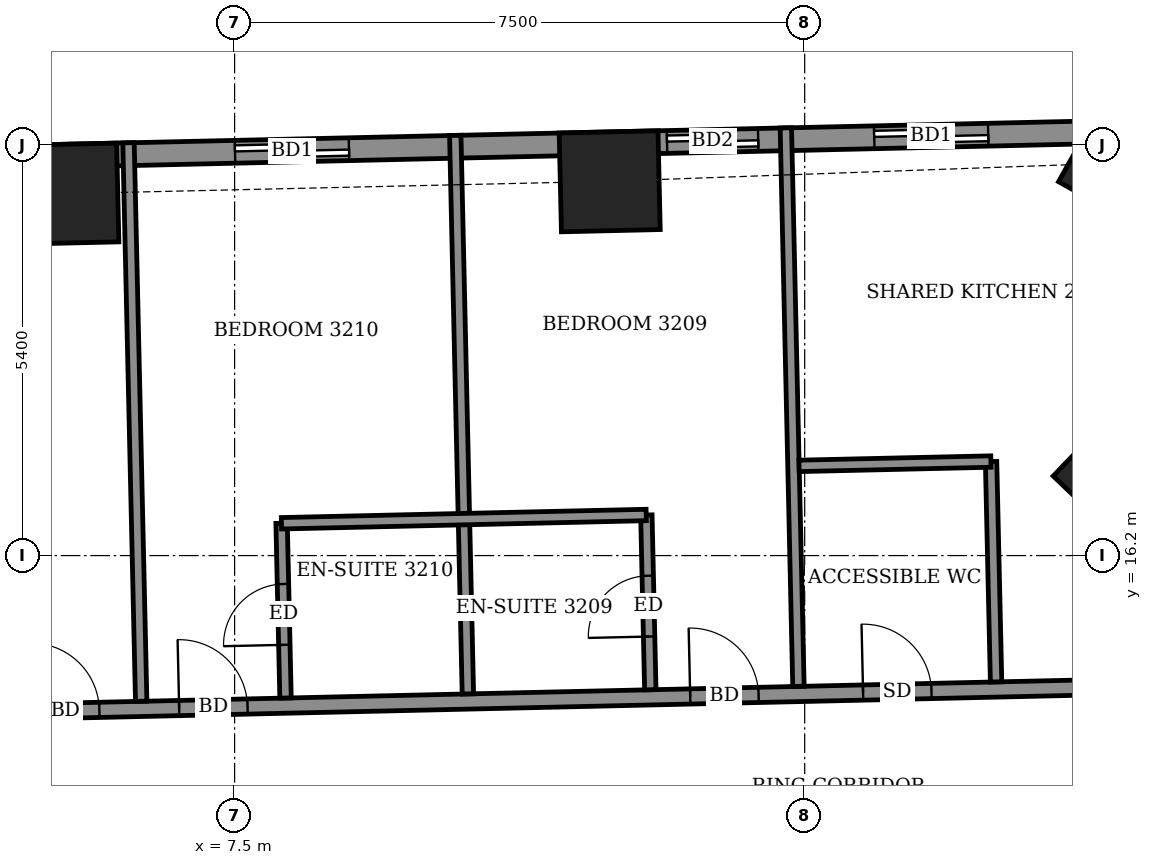
"""IFC4 building model, lengths in metres.
Left out: names, types, materials, properties, quantities, classifications, styles, units other than length and angle.
Written with IfcOpenShell. Run it as: python <this file> out.ifc"""

import sys

from ifc_helpers import new_model, si_unit, direction, frame, frame_2d, origin, origin_2d, place, context, subcontext, project, spatial, rectangle, extrude, element, fill, save


model = new_model("IFC4")
c1 = context("Model", 3, precision=1e-05, world=origin(), true_north=direction((0.0, 1.0)))
c2 = subcontext(c1, "Body", "Model", "MODEL_VIEW")
j1 = project(units=[si_unit("LENGTHUNIT", "METRE"), si_unit("PLANEANGLEUNIT", "RADIAN")], contexts=[c1])
p1 = place(None, origin())
s1 = spatial("IfcSite", under=j1, at=p1, CompositionType="ELEMENT")
p2 = place(p1, origin())
s2 = spatial("IfcBuilding", under=s1, at=p2, CompositionType="ELEMENT")
p3 = place(p2, frame((0.0, 0.0, 130.1)))
s3 = spatial("IfcBuildingStorey", under=s2, at=p3, CompositionType="ELEMENT", Elevation=130.1)
for number, where, z_axis, x_axis in (
    (1, (19.189, 17.267, -0.55), (0.0, 0.0, 1.0), (-0.723, 0.691, 0.0)),
    (2, (19.225, 21.369, -0.55), (0.0, 0.0, 1.0), (-0.873, 0.488, 0.0)),
    (3, (12.435, 21.124, -0.55), (0.0, 0.0, 1.0), (-1.0, -0.023, 0.0)),
    (4, (5.313, 20.962, -0.55), (0.0, 0.0, 1.0), (-1.0, -0.023, 0.0)),
):
    element("IfcColumn", number, at=place(p3, frame(where, z_axis=z_axis, x_axis=x_axis)), inside=s3, PredefinedType="COLUMN", context=c2, shape_type="SweptSolid", body=[
        extrude(rectangle(XDim=1.3, YDim=1.3, at=origin_2d()), origin(), (0.0, 0.0, 1.0), 3.6),
    ])
p4 = place(p3, frame((19.396, 21.782, 0.0), z_axis=(0.0, 0.0, 1.0), x_axis=(-0.999742636707, -0.022686126826, 0.0)))
e5 = element("IfcWall", 5, at=p4, inside=s3, PredefinedType="SOLIDWALL", context=c2, shape_type="SweptSolid", body=[
    extrude(rectangle(XDim=42.444, YDim=0.3, at=frame_2d((21.222, 0.0))), origin(), (0.0, 0.0, 1.0), 3.05),
])
p5 = place(p4, frame((1.982, 0.0, 0.0)))
e6 = element("IfcOpeningElement", 6, at=p5, cuts=e5, PredefinedType="OPENING", context=c2, shape_type="SweptSolid", body=[
    extrude(rectangle(XDim=1.5, YDim=2.4, at=frame_2d((0.75, 1.2))), frame((0.0, 0.16, 0.0), z_axis=(0.0, -1.0, 0.0), x_axis=(1.0, 0.0, 0.0)), (0.0, 0.0, 1.0), 0.32),
])
p6 = place(p4, frame((5.009, 0.0, 0.0)))
e7 = element("IfcOpeningElement", 7, at=p6, cuts=e5, PredefinedType="OPENING", context=c2, shape_type="SweptSolid", body=[
    extrude(rectangle(XDim=1.2, YDim=2.4, at=frame_2d((0.6, 1.2))), frame((0.0, 0.16, 0.0), z_axis=(0.0, -1.0, 0.0), x_axis=(1.0, 0.0, 0.0)), (0.0, 0.0, 1.0), 0.32),
])
p7 = place(p4, frame((10.394, 0.0, 0.0)))
e8 = element("IfcOpeningElement", 8, at=p7, cuts=e5, PredefinedType="OPENING", context=c2, shape_type="SweptSolid", body=[
    extrude(rectangle(XDim=1.5, YDim=2.4, at=frame_2d((0.75, 1.2))), frame((0.0, 0.16, 0.0), z_axis=(0.0, -1.0, 0.0), x_axis=(1.0, 0.0, 0.0)), (0.0, 0.0, 1.0), 0.32),
])
p8 = place(p4, frame((15.346, 0.0, 0.0)))
e9 = element("IfcOpeningElement", 9, at=p8, cuts=e5, PredefinedType="OPENING", context=c2, shape_type="SweptSolid", body=[
    extrude(rectangle(XDim=1.5, YDim=2.4, at=frame_2d((0.75, 1.2))), frame((0.0, 0.16, 0.0), z_axis=(0.0, -1.0, 0.0), x_axis=(1.0, 0.0, 0.0)), (0.0, 0.0, 1.0), 0.32),
])
p9 = place(p4, frame((18.508, 0.0, 0.0)))
e10 = element("IfcOpeningElement", 10, at=p9, cuts=e5, PredefinedType="OPENING", context=c2, shape_type="SweptSolid", body=[
    extrude(rectangle(XDim=1.5, YDim=2.4, at=frame_2d((0.75, 1.2))), frame((0.0, 0.16, 0.0), z_axis=(0.0, -1.0, 0.0), x_axis=(1.0, 0.0, 0.0)), (0.0, 0.0, 1.0), 0.32),
])
p10 = place(p4, frame((23.544, 0.0, 0.0)))
e11 = element("IfcOpeningElement", 11, at=p10, cuts=e5, PredefinedType="OPENING", context=c2, shape_type="SweptSolid", body=[
    extrude(rectangle(XDim=1.5, YDim=2.4, at=frame_2d((0.75, 1.2))), frame((0.0, 0.16, 0.0), z_axis=(0.0, -1.0, 0.0), x_axis=(1.0, 0.0, 0.0)), (0.0, 0.0, 1.0), 0.32),
])
p11 = place(p4, frame((29.195, 0.0, 0.0)))
e12 = element("IfcOpeningElement", 12, at=p11, cuts=e5, PredefinedType="OPENING", context=c2, shape_type="SweptSolid", body=[
    extrude(rectangle(XDim=1.5, YDim=2.4, at=frame_2d((0.75, 1.2))), frame((0.0, 0.16, 0.0), z_axis=(0.0, -1.0, 0.0), x_axis=(1.0, 0.0, 0.0)), (0.0, 0.0, 1.0), 0.32),
])
p12 = place(p4, frame((32.357, 0.0, 0.0)))
e13 = element("IfcOpeningElement", 13, at=p12, cuts=e5, PredefinedType="OPENING", context=c2, shape_type="SweptSolid", body=[
    extrude(rectangle(XDim=1.5, YDim=2.4, at=frame_2d((0.75, 1.2))), frame((0.0, 0.16, 0.0), z_axis=(0.0, -1.0, 0.0), x_axis=(1.0, 0.0, 0.0)), (0.0, 0.0, 1.0), 0.32),
])
p13 = place(p4, frame((37.524, 0.0, 0.9)))
e14 = element("IfcOpeningElement", 14, at=p13, cuts=e5, PredefinedType="OPENING", context=c2, shape_type="SweptSolid", body=[
    extrude(rectangle(XDim=2.4, YDim=1.5, at=frame_2d((1.2, 0.75))), frame((0.0, 0.16, 0.0), z_axis=(0.0, -1.0, 0.0), x_axis=(1.0, 0.0, 0.0)), (0.0, 0.0, 1.0), 0.32),
])
p14 = place(p3, frame((-26.421, 13.441, 0.0), z_axis=(0.0, 0.0, 1.0), x_axis=(0.999742754064, 0.022680954485, 0.0)))
e15 = element("IfcWall", 15, at=p14, inside=s3, PredefinedType="PARTITIONING", context=c2, shape_type="SweptSolid", body=[
    extrude(rectangle(XDim=48.945, YDim=0.2, at=frame_2d((24.472, 0.0))), origin(), (0.0, 0.0, 1.0), 3.05),
])
p15 = place(p14, frame((46.647, 0.0, 0.0)))
e16 = element("IfcOpeningElement", 16, at=p15, cuts=e15, PredefinedType="OPENING", context=c2, shape_type="SweptSolid", body=[
    extrude(rectangle(XDim=1.0, YDim=2.1, at=frame_2d((0.5, 1.05))), frame((0.0, 0.11, 0.0), z_axis=(0.0, -1.0, 0.0), x_axis=(1.0, 0.0, 0.0)), (0.0, 0.0, 1.0), 0.22),
])
p16 = place(p14, frame((42.2, 0.0, 0.0)))
e17 = element("IfcOpeningElement", 17, at=p16, cuts=e15, PredefinedType="OPENING", context=c2, shape_type="SweptSolid", body=[
    extrude(rectangle(XDim=0.9, YDim=2.1, at=frame_2d((0.45, 1.05))), frame((0.0, 0.11, 0.0), z_axis=(0.0, -1.0, 0.0), x_axis=(1.0, 0.0, 0.0)), (0.0, 0.0, 1.0), 0.22),
])
p17 = place(p14, frame((39.925, 0.0, 0.0)))
e18 = element("IfcOpeningElement", 18, at=p17, cuts=e15, PredefinedType="OPENING", context=c2, shape_type="SweptSolid", body=[
    extrude(rectangle(XDim=0.9, YDim=2.1, at=frame_2d((0.45, 1.05))), frame((0.0, 0.11, 0.0), z_axis=(0.0, -1.0, 0.0), x_axis=(1.0, 0.0, 0.0)), (0.0, 0.0, 1.0), 0.22),
])
p18 = place(p14, frame((33.2, 0.0, 0.0)))
e19 = element("IfcOpeningElement", 19, at=p18, cuts=e15, PredefinedType="OPENING", context=c2, shape_type="SweptSolid", body=[
    extrude(rectangle(XDim=0.9, YDim=2.1, at=frame_2d((0.45, 1.05))), frame((0.0, 0.11, 0.0), z_axis=(0.0, -1.0, 0.0), x_axis=(1.0, 0.0, 0.0)), (0.0, 0.0, 1.0), 0.22),
])
p19 = place(p14, frame((31.25, 0.0, 0.0)))
e20 = element("IfcOpeningElement", 20, at=p19, cuts=e15, PredefinedType="OPENING", context=c2, shape_type="SweptSolid", body=[
    extrude(rectangle(XDim=0.9, YDim=2.1, at=frame_2d((0.45, 1.05))), frame((0.0, 0.11, 0.0), z_axis=(0.0, -1.0, 0.0), x_axis=(1.0, 0.0, 0.0)), (0.0, 0.0, 1.0), 0.22),
])
p20 = place(p14, frame((24.5, 0.0, 0.0)))
e21 = element("IfcOpeningElement", 21, at=p20, cuts=e15, PredefinedType="OPENING", context=c2, shape_type="SweptSolid", body=[
    extrude(rectangle(XDim=0.9, YDim=2.1, at=frame_2d((0.45, 1.05))), frame((0.0, 0.11, 0.0), z_axis=(0.0, -1.0, 0.0), x_axis=(1.0, 0.0, 0.0)), (0.0, 0.0, 1.0), 0.22),
])
p21 = place(p14, frame((22.45, 0.0, 0.0)))
e22 = element("IfcOpeningElement", 22, at=p21, cuts=e15, PredefinedType="OPENING", context=c2, shape_type="SweptSolid", body=[
    extrude(rectangle(XDim=0.9, YDim=2.1, at=frame_2d((0.45, 1.05))), frame((0.0, 0.11, 0.0), z_axis=(0.0, -1.0, 0.0), x_axis=(1.0, 0.0, 0.0)), (0.0, 0.0, 1.0), 0.22),
])
p22 = place(p14, frame((15.475, 0.0, 0.0)))
e23 = element("IfcOpeningElement", 23, at=p22, cuts=e15, PredefinedType="OPENING", context=c2, shape_type="SweptSolid", body=[
    extrude(rectangle(XDim=0.9, YDim=2.1, at=frame_2d((0.45, 1.05))), frame((0.0, 0.11, 0.0), z_axis=(0.0, -1.0, 0.0), x_axis=(1.0, 0.0, 0.0)), (0.0, 0.0, 1.0), 0.22),
])
p23 = place(p14, frame((13.4, 0.0, 0.0)))
e24 = element("IfcOpeningElement", 24, at=p23, cuts=e15, PredefinedType="OPENING", context=c2, shape_type="SweptSolid", body=[
    extrude(rectangle(XDim=0.9, YDim=2.1, at=frame_2d((0.45, 1.05))), frame((0.0, 0.11, 0.0), z_axis=(0.0, -1.0, 0.0), x_axis=(1.0, 0.0, 0.0)), (0.0, 0.0, 1.0), 0.22),
])
p24 = place(p14, frame((2.725, 0.0, 0.0)))
e25 = element("IfcOpeningElement", 25, at=p24, cuts=e15, PredefinedType="OPENING", context=c2, shape_type="SweptSolid", body=[
    extrude(rectangle(XDim=1.0, YDim=2.1, at=frame_2d((0.5, 1.05))), frame((0.0, 0.11, 0.0), z_axis=(0.0, -1.0, 0.0), x_axis=(1.0, 0.0, 0.0)), (0.0, 0.0, 1.0), 0.22),
])
p25 = place(p14, frame((8.7, 0.0, 0.0)))
e26 = element("IfcOpeningElement", 26, at=p25, cuts=e15, PredefinedType="OPENING", context=c2, shape_type="SweptSolid", body=[
    extrude(rectangle(XDim=0.9, YDim=2.1, at=frame_2d((0.45, 1.05))), frame((0.0, 0.11, 0.0), z_axis=(0.0, -1.0, 0.0), x_axis=(1.0, 0.0, 0.0)), (0.0, 0.0, 1.0), 0.22),
])
p26 = place(p3, frame((6.271, 14.283, 0.0), z_axis=(0.0, 0.0, 1.0), x_axis=(-0.022719896304, 0.99974186984, 0.0)))
e27 = element("IfcWall", 27, at=p26, inside=s3, PredefinedType="PARTITIONING", context=c2, shape_type="SweptSolid", body=[
    extrude(rectangle(XDim=7.35, YDim=0.15, at=frame_2d((3.675, 0.0))), origin(), (0.0, 0.0, 1.0), 2.55),
])
p27 = place(p3, frame((8.17, 14.326, 0.0), z_axis=(0.0, 0.0, 1.0), x_axis=(-0.022612884682, 0.999744296031, 0.0)))
e28 = element("IfcWall", 28, at=p27, inside=s3, PredefinedType="PARTITIONING", context=c2, shape_type="SweptSolid", body=[
    extrude(rectangle(XDim=2.3, YDim=0.15, at=frame_2d((1.15, 0.0))), origin(), (0.0, 0.0, 1.0), 3.05),
])
p28 = place(p27, frame((0.7, 0.0, 0.0)))
e29 = element("IfcOpeningElement", 29, at=p28, cuts=e28, PredefinedType="OPENING", context=c2, shape_type="SweptSolid", body=[
    extrude(rectangle(XDim=0.8, YDim=2.1, at=frame_2d((0.4, 1.05))), frame((0.0, 0.085, 0.0), z_axis=(0.0, -1.0, 0.0), x_axis=(1.0, 0.0, 0.0)), (0.0, 0.0, 1.0), 0.17),
])
p29 = place(p3, frame((10.569, 14.38, 0.0), z_axis=(0.0, 0.0, 1.0), x_axis=(-0.022587099398, 0.999744878927, 0.0)))
e30 = element("IfcWall", 30, at=p29, inside=s3, PredefinedType="PARTITIONING", context=c2, shape_type="SweptSolid", body=[
    extrude(rectangle(XDim=7.35, YDim=0.15, at=frame_2d((3.675, 0.0))), origin(), (0.0, 0.0, 1.0), 2.55),
])
p30 = place(p3, frame((12.969, 14.435, 0.0), z_axis=(0.0, 0.0, 1.0), x_axis=(-0.022615284993, 0.999744241736, 0.0)))
e31 = element("IfcWall", 31, at=p30, inside=s3, PredefinedType="PARTITIONING", context=c2, shape_type="SweptSolid", body=[
    extrude(rectangle(XDim=2.299, YDim=0.15, at=frame_2d((1.15, 0.0))), origin(), (0.0, 0.0, 1.0), 3.05),
])
p31 = place(p30, frame((0.7, 0.0, 0.0)))
e32 = element("IfcOpeningElement", 32, at=p31, cuts=e31, PredefinedType="OPENING", context=c2, shape_type="SweptSolid", body=[
    extrude(rectangle(XDim=0.8, YDim=2.1, at=frame_2d((0.4, 1.05))), frame((0.0, 0.085, 0.0), z_axis=(0.0, -1.0, 0.0), x_axis=(1.0, 0.0, 0.0)), (0.0, 0.0, 1.0), 0.17),
])
p32 = place(p3, frame((14.918, 14.479, 0.0), z_axis=(0.0, 0.0, 1.0), x_axis=(-0.022587849492, 0.99974486198, 0.0)))
e33 = element("IfcWall", 33, at=p32, inside=s3, PredefinedType="PARTITIONING", context=c2, shape_type="SweptSolid", body=[
    extrude(rectangle(XDim=7.35, YDim=0.15, at=frame_2d((3.675, 0.0))), origin(), (0.0, 0.0, 1.0), 2.55),
])
p33 = place(p3, frame((17.518, 14.538, 0.0), z_axis=(0.0, 0.0, 1.0), x_axis=(-0.022817032779, 0.999739657619, 0.0)))
e34 = element("IfcWall", 34, at=p33, inside=s3, PredefinedType="PARTITIONING", context=c2, shape_type="SweptSolid", body=[
    extrude(rectangle(XDim=2.9, YDim=0.15, at=frame_2d((1.45, 0.0))), origin(), (0.0, 0.0, 1.0), 3.05),
])
p34 = place(p3, frame((8.116, 16.625, 0.0), z_axis=(0.0, 0.0, 1.0), x_axis=(0.999742701292, 0.022683280499, 0.0)))
e35 = element("IfcWall", 35, at=p34, inside=s3, PredefinedType="PARTITIONING", context=c2, shape_type="SweptSolid", body=[
    extrude(rectangle(XDim=4.8, YDim=0.15, at=frame_2d((2.4, 0.0))), origin(), (0.0, 0.0, 1.0), 3.05),
])
p35 = place(p3, frame((14.926, 17.38, 0.0), z_axis=(0.0, 0.0, 1.0), x_axis=(0.99974392816, 0.022629142889, 0.0)))
e36 = element("IfcWall", 36, at=p35, inside=s3, PredefinedType="PARTITIONING", context=c2, shape_type="SweptSolid", body=[
    extrude(rectangle(XDim=2.525, YDim=0.15, at=frame_2d((1.262, 0.0))), origin(), (0.0, 0.0, 1.0), 3.05),
])
p36 = place(p5, origin())
e37 = element("IfcDoor", 37, at=p36, inside=s3, OperationType="SLIDING_TO_LEFT", PredefinedType="DOOR", context=c2, shape_type="SweptSolid", body=[
    extrude(rectangle(XDim=1.5, YDim=2.4, at=frame_2d((0.75, 1.2))), frame((0.0, 0.025, 0.0), z_axis=(0.0, -1.0, 0.0), x_axis=(1.0, 0.0, 0.0)), (0.0, 0.0, 1.0), 0.05),
])
fill(e6, e37)
p37 = place(p6, origin())
e38 = element("IfcDoor", 38, at=p37, inside=s3, OperationType="SLIDING_TO_LEFT", PredefinedType="DOOR", context=c2, shape_type="SweptSolid", body=[
    extrude(rectangle(XDim=1.2, YDim=2.4, at=frame_2d((0.6, 1.2))), frame((0.0, 0.025, 0.0), z_axis=(0.0, -1.0, 0.0), x_axis=(1.0, 0.0, 0.0)), (0.0, 0.0, 1.0), 0.05),
])
fill(e7, e38)
p38 = place(p7, origin())
e39 = element("IfcDoor", 39, at=p38, inside=s3, OperationType="SLIDING_TO_LEFT", PredefinedType="DOOR", context=c2, shape_type="SweptSolid", body=[
    extrude(rectangle(XDim=1.5, YDim=2.4, at=frame_2d((0.75, 1.2))), frame((0.0, 0.025, 0.0), z_axis=(0.0, -1.0, 0.0), x_axis=(1.0, 0.0, 0.0)), (0.0, 0.0, 1.0), 0.05),
])
fill(e8, e39)
p39 = place(p16, origin())
e40 = element("IfcDoor", 40, at=p39, inside=s3, OperationType="SINGLE_SWING_LEFT", PredefinedType="DOOR", context=c2, shape_type="SweptSolid", body=[
    extrude(rectangle(XDim=0.9, YDim=2.1, at=frame_2d((0.45, 1.05))), frame((0.0, 0.025, 0.0), z_axis=(0.0, -1.0, 0.0), x_axis=(1.0, 0.0, 0.0)), (0.0, 0.0, 1.0), 0.05),
])
fill(e17, e40)
p40 = place(p17, origin())
e41 = element("IfcDoor", 41, at=p40, inside=s3, OperationType="SINGLE_SWING_LEFT", PredefinedType="DOOR", context=c2, shape_type="SweptSolid", body=[
    extrude(rectangle(XDim=0.9, YDim=2.1, at=frame_2d((0.45, 1.05))), frame((0.0, 0.025, 0.0), z_axis=(0.0, -1.0, 0.0), x_axis=(1.0, 0.0, 0.0)), (0.0, 0.0, 1.0), 0.05),
])
fill(e18, e41)
p41 = place(p31, origin())
e42 = element("IfcDoor", 42, at=p41, inside=s3, OperationType="SINGLE_SWING_LEFT", PredefinedType="DOOR", context=c2, shape_type="SweptSolid", body=[
    extrude(rectangle(XDim=0.8, YDim=2.1, at=frame_2d((0.4, 1.05))), frame((0.0, 0.025, 0.0), z_axis=(0.0, -1.0, 0.0), x_axis=(1.0, 0.0, 0.0)), (0.0, 0.0, 1.0), 0.05),
])
fill(e32, e42)
p42 = place(p18, origin())
e43 = element("IfcDoor", 43, at=p42, inside=s3, OperationType="SINGLE_SWING_RIGHT", PredefinedType="DOOR", context=c2, shape_type="SweptSolid", body=[
    extrude(rectangle(XDim=0.9, YDim=2.1, at=frame_2d((0.45, 1.05))), frame((0.0, 0.025, 0.0), z_axis=(0.0, -1.0, 0.0), x_axis=(1.0, 0.0, 0.0)), (0.0, 0.0, 1.0), 0.05),
])
fill(e19, e43)
p43 = place(p28, origin())
e44 = element("IfcDoor", 44, at=p43, inside=s3, OperationType="SINGLE_SWING_RIGHT", PredefinedType="DOOR", context=c2, shape_type="SweptSolid", body=[
    extrude(rectangle(XDim=0.8, YDim=2.1, at=frame_2d((0.4, 1.05))), frame((0.0, 0.025, 0.0), z_axis=(0.0, -1.0, 0.0), x_axis=(1.0, 0.0, 0.0)), (0.0, 0.0, 1.0), 0.05),
])
fill(e29, e44)
p44 = place(p19, origin())
e45 = element("IfcDoor", 45, at=p44, inside=s3, OperationType="SINGLE_SWING_LEFT", PredefinedType="DOOR", context=c2, shape_type="SweptSolid", body=[
    extrude(rectangle(XDim=0.9, YDim=2.1, at=frame_2d((0.45, 1.05))), frame((0.0, 0.025, 0.0), z_axis=(0.0, -1.0, 0.0), x_axis=(1.0, 0.0, 0.0)), (0.0, 0.0, 1.0), 0.05),
])
fill(e20, e45)
save(model, sys.argv[1])
